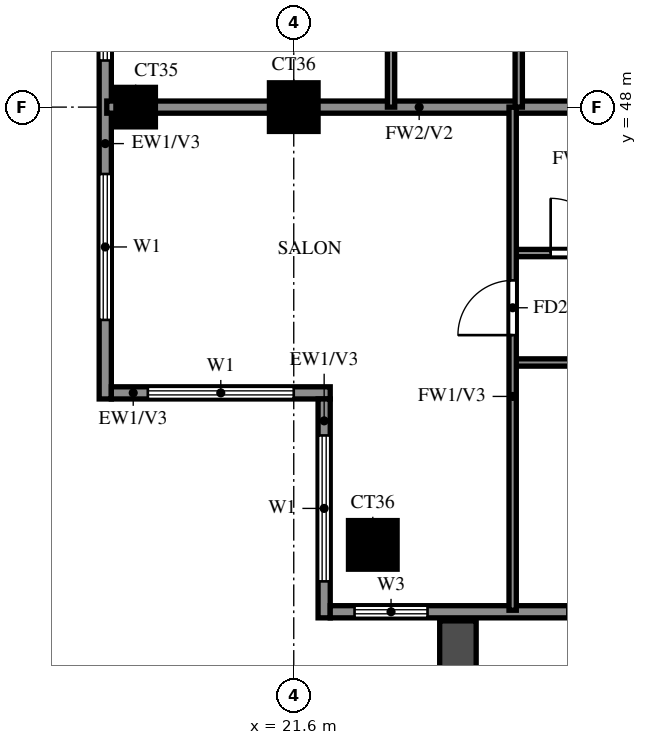
"""IFC4 building model, lengths in metres.
Left out: names, types, materials, properties, quantities, classifications, styles, units other than length and angle.
Written with IfcOpenShell. Run it as: python <this file> out.ifc"""

import sys

from ifc_helpers import new_model, si_unit, direction, frame, frame_2d, origin, origin_2d, place, context, subcontext, project, spatial, rectangle, extrude, source, transform, mapped, element, fill, save


model = new_model("IFC4")
c1 = context("Model", 3, precision=1e-05, world=origin(), true_north=direction((0.0, 1.0)))
c2 = subcontext(c1, "Body", "Model", "MODEL_VIEW")
j1 = project(units=[si_unit("LENGTHUNIT", "METRE"), si_unit("PLANEANGLEUNIT", "RADIAN")], contexts=[c1])
p1 = place(None, origin())
s1 = spatial("IfcSite", under=j1, at=p1, CompositionType="ELEMENT")
p2 = place(p1, origin())
s2 = spatial("IfcBuilding", under=s1, at=p2, CompositionType="ELEMENT")
p3 = place(p2, frame((0.0, 0.0, 236.0)))
s3 = spatial("IfcBuildingStorey", under=s2, at=p3, CompositionType="ELEMENT", Elevation=236.0)
m1 = source(origin(), c2, "Body", "SweptSolid", [
    extrude(rectangle(XDim=0.8, YDim=0.8, at=origin_2d()), origin(), (0.0, 0.0, 1.0), 3.22),
])
p4 = place(p3, frame((22.9, 40.8, 0.0), z_axis=(0.0, 0.0, 1.0), x_axis=(1.0, 0.0, 0.0)))
e1 = element("IfcColumn", 1, at=p4, inside=s3, PredefinedType="COLUMN", context=c2, shape_type="MappedRepresentation", body=[
    mapped(m1, transform((0.0, 0.0, 0.0))),
])
m2 = source(origin(), c2, "Body", "SweptSolid", [
    extrude(rectangle(XDim=0.65, YDim=0.65, at=origin_2d()), origin(), (0.0, 0.0, 1.0), 3.22),
])
p5 = place(p3, frame((19.0, 48.0, 0.0), z_axis=(0.0, 0.0, 1.0), x_axis=(1.0, 0.0, 0.0)))
e2 = element("IfcColumn", 2, at=p5, inside=s3, PredefinedType="COLUMN", context=c2, shape_type="MappedRepresentation", body=[
    mapped(m2, transform((0.0, 0.0, 0.0))),
])
p6 = place(p3, frame((21.6, 48.0, 0.0), z_axis=(0.0, 0.0, 1.0), x_axis=(1.0, 0.0, 0.0)))
e3 = element("IfcColumn", 3, at=p6, inside=s3, PredefinedType="COLUMN", context=c2, shape_type="MappedRepresentation", body=[
    mapped(m1, transform((0.0, 0.0, 0.0))),
])
p7 = place(p3, frame((18.5, 55.2, 0.0), z_axis=(0.0, 0.0, 1.0), x_axis=(0.0, -1.0, 0.0)))
e4 = element("IfcWall", 4, at=p7, inside=s3, PredefinedType="SOLIDWALL", context=c2, shape_type="SweptSolid", body=[
    extrude(rectangle(XDim=12.0, YDim=0.2, at=frame_2d((6.0, 0.0))), origin(), (0.0, 0.0, 1.0), 3.22),
])
p8 = place(p7, frame((8.3, 0.0, 0.6)))
e5 = element("IfcOpeningElement", 5, at=p8, cuts=e4, PredefinedType="OPENING", context=c2, shape_type="SweptSolid", body=[
    extrude(rectangle(XDim=2.4, YDim=2.4, at=frame_2d((1.2, 1.2))), frame((0.0, 0.11, 0.0), z_axis=(0.0, -1.0, 0.0), x_axis=(1.0, 0.0, 0.0)), (0.0, 0.0, 1.0), 0.22),
])
p9 = place(p7, frame((0.967, 0.0, 0.6)))
e6 = element("IfcOpeningElement", 6, at=p9, cuts=e4, PredefinedType="OPENING", context=c2, shape_type="SweptSolid", body=[
    extrude(rectangle(XDim=2.4, YDim=2.4, at=frame_2d((1.2, 1.2))), frame((0.0, 0.11, 0.0), z_axis=(0.0, -1.0, 0.0), x_axis=(1.0, 0.0, 0.0)), (0.0, 0.0, 1.0), 0.22),
])
p10 = place(p7, frame((4.033, 0.0, 0.6)))
e7 = element("IfcOpeningElement", 7, at=p10, cuts=e4, PredefinedType="OPENING", context=c2, shape_type="SweptSolid", body=[
    extrude(rectangle(XDim=2.4, YDim=2.4, at=frame_2d((1.2, 1.2))), frame((0.0, 0.11, 0.0), z_axis=(0.0, -1.0, 0.0), x_axis=(1.0, 0.0, 0.0)), (0.0, 0.0, 1.0), 0.22),
])
p11 = place(p3, frame((18.6, 43.3, 0.0), z_axis=(0.0, 0.0, 1.0), x_axis=(1.0, 0.0, 0.0)))
e8 = element("IfcWall", 8, at=p11, inside=s3, PredefinedType="SOLIDWALL", context=c2, shape_type="SweptSolid", body=[
    extrude(rectangle(XDim=3.6, YDim=0.2, at=frame_2d((1.8, 0.0))), origin(), (0.0, 0.0, 1.0), 3.22),
])
p12 = place(p11, frame((0.6, 0.0, 0.6)))
e9 = element("IfcOpeningElement", 9, at=p12, cuts=e8, PredefinedType="OPENING", context=c2, shape_type="SweptSolid", body=[
    extrude(rectangle(XDim=2.4, YDim=2.4, at=frame_2d((1.2, 1.2))), frame((0.0, 0.11, 0.0), z_axis=(0.0, -1.0, 0.0), x_axis=(1.0, 0.0, 0.0)), (0.0, 0.0, 1.0), 0.22),
])
p13 = place(p3, frame((22.1, 43.2, 0.0), z_axis=(0.0, 0.0, 1.0), x_axis=(0.0, -1.0, 0.0)))
e10 = element("IfcWall", 10, at=p13, inside=s3, PredefinedType="SOLIDWALL", context=c2, shape_type="SweptSolid", body=[
    extrude(rectangle(XDim=3.6, YDim=0.2, at=frame_2d((1.8, 0.0))), origin(), (0.0, 0.0, 1.0), 3.22),
])
p14 = place(p13, frame((0.6, 0.0, 0.6)))
e11 = element("IfcOpeningElement", 11, at=p14, cuts=e10, PredefinedType="OPENING", context=c2, shape_type="SweptSolid", body=[
    extrude(rectangle(XDim=2.4, YDim=2.4, at=frame_2d((1.2, 1.2))), frame((0.0, 0.11, 0.0), z_axis=(0.0, -1.0, 0.0), x_axis=(1.0, 0.0, 0.0)), (0.0, 0.0, 1.0), 0.22),
])
p15 = place(p3, frame((22.2, 39.7, 0.0), z_axis=(0.0, 0.0, 1.0), x_axis=(1.0, 0.0, 0.0)))
e12 = element("IfcWall", 12, at=p15, inside=s3, PredefinedType="SOLIDWALL", context=c2, shape_type="SweptSolid", body=[
    extrude(rectangle(XDim=19.8, YDim=0.2, at=frame_2d((9.9, 0.0))), origin(), (0.0, 0.0, 1.0), 3.22),
])
p16 = place(p15, frame((3.9, 0.0, 0.0)))
e13 = element("IfcOpeningElement", 13, at=p16, cuts=e12, PredefinedType="OPENING", context=c2, shape_type="SweptSolid", body=[
    extrude(rectangle(XDim=1.8, YDim=2.4, at=frame_2d((0.9, 1.2))), frame((0.0, 0.11, 0.0), z_axis=(0.0, -1.0, 0.0), x_axis=(1.0, 0.0, 0.0)), (0.0, 0.0, 1.0), 0.22),
])
p17 = place(p15, frame((0.4, 0.0, 0.6)))
e14 = element("IfcOpeningElement", 14, at=p17, cuts=e12, PredefinedType="OPENING", context=c2, shape_type="SweptSolid", body=[
    extrude(rectangle(XDim=1.2, YDim=2.4, at=frame_2d((0.6, 1.2))), frame((0.0, 0.11, 0.0), z_axis=(0.0, -1.0, 0.0), x_axis=(1.0, 0.0, 0.0)), (0.0, 0.0, 1.0), 0.22),
])
p18 = place(p15, frame((6.9, 0.0, 0.6)))
e15 = element("IfcOpeningElement", 15, at=p18, cuts=e12, PredefinedType="OPENING", context=c2, shape_type="SweptSolid", body=[
    extrude(rectangle(XDim=1.2, YDim=2.4, at=frame_2d((0.6, 1.2))), frame((0.0, 0.11, 0.0), z_axis=(0.0, -1.0, 0.0), x_axis=(1.0, 0.0, 0.0)), (0.0, 0.0, 1.0), 0.22),
])
p19 = place(p15, frame((9.3, 0.0, 0.6)))
e16 = element("IfcOpeningElement", 16, at=p19, cuts=e12, PredefinedType="OPENING", context=c2, shape_type="SweptSolid", body=[
    extrude(rectangle(XDim=1.8, YDim=2.4, at=frame_2d((0.9, 1.2))), frame((0.0, 0.11, 0.0), z_axis=(0.0, -1.0, 0.0), x_axis=(1.0, 0.0, 0.0)), (0.0, 0.0, 1.0), 0.22),
])
p20 = place(p3, frame((24.3, 39.55, 0.0), z_axis=(0.0, 0.0, 1.0), x_axis=(0.0, -1.0, 0.0)))
e17 = element("IfcWall", 17, at=p20, inside=s3, PredefinedType="SOLIDWALL", context=c2, shape_type="SweptSolid", body=[
    extrude(rectangle(XDim=2.65, YDim=0.6, at=frame_2d((1.325, 0.0))), origin(), (0.0, 0.0, 1.0), 2.85),
])
p21 = place(p3, frame((18.525, 48.0, 0.0), z_axis=(0.0, 0.0, 1.0), x_axis=(1.0, 0.0, 0.0)))
e18 = element("IfcWall", 18, at=p21, inside=s3, PredefinedType="SOLIDWALL", context=c2, shape_type="SweptSolid", body=[
    extrude(rectangle(XDim=10.275, YDim=0.2, at=frame_2d((5.138, 0.0))), origin(), (0.0, 0.0, 1.0), 3.22),
])
p22 = place(p3, frame((25.2, 43.8, 0.0), z_axis=(0.0, 0.0, 1.0), x_axis=(1.0, 0.0, 0.0)))
e19 = element("IfcWall", 19, at=p22, inside=s3, PredefinedType="PARTITIONING", context=c2, shape_type="SweptSolid", body=[
    extrude(rectangle(XDim=8.4, YDim=0.12, at=frame_2d((4.2, 0.0))), origin(), (0.0, 0.0, 1.0), 3.22),
])
p23 = place(p22, frame((1.35, 0.0, 0.0)))
e20 = element("IfcOpeningElement", 20, at=p23, cuts=e19, PredefinedType="OPENING", context=c2, shape_type="SweptSolid", body=[
    extrude(rectangle(XDim=0.9, YDim=2.1, at=frame_2d((0.45, 1.05))), frame((0.0, 0.07, 0.0), z_axis=(0.0, -1.0, 0.0), x_axis=(1.0, 0.0, 0.0)), (0.0, 0.0, 1.0), 0.14),
])
p24 = place(p22, frame((5.55, 0.0, 0.0)))
e21 = element("IfcOpeningElement", 21, at=p24, cuts=e19, PredefinedType="OPENING", context=c2, shape_type="SweptSolid", body=[
    extrude(rectangle(XDim=0.9, YDim=2.1, at=frame_2d((0.45, 1.05))), frame((0.0, 0.07, 0.0), z_axis=(0.0, -1.0, 0.0), x_axis=(1.0, 0.0, 0.0)), (0.0, 0.0, 1.0), 0.14),
])
p25 = place(p3, frame((25.2, 45.6, 0.0), z_axis=(0.0, 0.0, 1.0), x_axis=(1.0, 0.0, 0.0)))
e22 = element("IfcWall", 22, at=p25, inside=s3, PredefinedType="PARTITIONING", context=c2, shape_type="SweptSolid", body=[
    extrude(rectangle(XDim=6.0, YDim=0.12, at=frame_2d((3.0, 0.0))), origin(), (0.0, 0.0, 1.0), 3.22),
])
p26 = place(p25, frame((0.625, 0.0, 0.0)))
e23 = element("IfcOpeningElement", 23, at=p26, cuts=e22, PredefinedType="OPENING", context=c2, shape_type="SweptSolid", body=[
    extrude(rectangle(XDim=0.9, YDim=2.1, at=frame_2d((0.45, 1.05))), frame((0.0, 0.07, 0.0), z_axis=(0.0, -1.0, 0.0), x_axis=(1.0, 0.0, 0.0)), (0.0, 0.0, 1.0), 0.14),
])
p27 = place(p25, frame((3.625, 0.0, 0.0)))
e24 = element("IfcOpeningElement", 24, at=p27, cuts=e22, PredefinedType="OPENING", context=c2, shape_type="SweptSolid", body=[
    extrude(rectangle(XDim=0.9, YDim=2.1, at=frame_2d((0.45, 1.05))), frame((0.0, 0.07, 0.0), z_axis=(0.0, -1.0, 0.0), x_axis=(1.0, 0.0, 0.0)), (0.0, 0.0, 1.0), 0.14),
])
p28 = place(p3, frame((23.2, 48.0, 0.0), z_axis=(0.0, 0.0, 1.0), x_axis=(0.0, 1.0, 0.0)))
e25 = element("IfcWall", 25, at=p28, inside=s3, PredefinedType="PARTITIONING", context=c2, shape_type="SweptSolid", body=[
    extrude(rectangle(XDim=25.2, YDim=0.12, at=frame_2d((12.6, 0.0))), origin(), (0.0, 0.0, 1.0), 3.22),
])
p29 = place(p28, frame((2.85, 0.0, 0.0)))
e26 = element("IfcOpeningElement", 26, at=p29, cuts=e25, PredefinedType="OPENING", context=c2, shape_type="SweptSolid", body=[
    extrude(rectangle(XDim=1.5, YDim=2.1, at=frame_2d((0.75, 1.05))), frame((0.0, 0.07, 0.0), z_axis=(0.0, -1.0, 0.0), x_axis=(1.0, 0.0, 0.0)), (0.0, 0.0, 1.0), 0.14),
])
p30 = place(p28, frame((8.55, 0.0, 0.0)))
e27 = element("IfcOpeningElement", 27, at=p30, cuts=e25, PredefinedType="OPENING", context=c2, shape_type="SweptSolid", body=[
    extrude(rectangle(XDim=0.9, YDim=2.1, at=frame_2d((0.45, 1.05))), frame((0.0, 0.07, 0.0), z_axis=(0.0, -1.0, 0.0), x_axis=(1.0, 0.0, 0.0)), (0.0, 0.0, 1.0), 0.14),
])
p31 = place(p28, frame((12.15, 0.0, 0.0)))
e28 = element("IfcOpeningElement", 28, at=p31, cuts=e25, PredefinedType="OPENING", context=c2, shape_type="SweptSolid", body=[
    extrude(rectangle(XDim=0.9, YDim=2.1, at=frame_2d((0.45, 1.05))), frame((0.0, 0.07, 0.0), z_axis=(0.0, -1.0, 0.0), x_axis=(1.0, 0.0, 0.0)), (0.0, 0.0, 1.0), 0.14),
])
p32 = place(p28, frame((15.75, 0.0, 0.0)))
e29 = element("IfcOpeningElement", 29, at=p32, cuts=e25, PredefinedType="OPENING", context=c2, shape_type="SweptSolid", body=[
    extrude(rectangle(XDim=0.9, YDim=2.1, at=frame_2d((0.45, 1.05))), frame((0.0, 0.07, 0.0), z_axis=(0.0, -1.0, 0.0), x_axis=(1.0, 0.0, 0.0)), (0.0, 0.0, 1.0), 0.14),
])
p33 = place(p28, frame((19.35, 0.0, 0.0)))
e30 = element("IfcOpeningElement", 30, at=p33, cuts=e25, PredefinedType="OPENING", context=c2, shape_type="SweptSolid", body=[
    extrude(rectangle(XDim=0.9, YDim=2.1, at=frame_2d((0.45, 1.05))), frame((0.0, 0.07, 0.0), z_axis=(0.0, -1.0, 0.0), x_axis=(1.0, 0.0, 0.0)), (0.0, 0.0, 1.0), 0.14),
])
p34 = place(p28, frame((22.95, 0.0, 0.0)))
e31 = element("IfcOpeningElement", 31, at=p34, cuts=e25, PredefinedType="OPENING", context=c2, shape_type="SweptSolid", body=[
    extrude(rectangle(XDim=0.9, YDim=2.1, at=frame_2d((0.45, 1.05))), frame((0.0, 0.07, 0.0), z_axis=(0.0, -1.0, 0.0), x_axis=(1.0, 0.0, 0.0)), (0.0, 0.0, 1.0), 0.14),
])
p35 = place(p3, frame((25.2, 39.725, 0.0), z_axis=(0.0, 0.0, 1.0), x_axis=(0.0, 1.0, 0.0)))
e32 = element("IfcWall", 32, at=p35, inside=s3, PredefinedType="PARTITIONING", context=c2, shape_type="SweptSolid", body=[
    extrude(rectangle(XDim=8.275, YDim=0.12, at=frame_2d((4.137, 0.0))), origin(), (0.0, 0.0, 1.0), 3.22),
])
p36 = place(p35, frame((4.525, 0.0, 0.0)))
e33 = element("IfcOpeningElement", 33, at=p36, cuts=e32, PredefinedType="OPENING", context=c2, shape_type="SweptSolid", body=[
    extrude(rectangle(XDim=0.9, YDim=2.1, at=frame_2d((0.45, 1.05))), frame((0.0, 0.07, 0.0), z_axis=(0.0, -1.0, 0.0), x_axis=(1.0, 0.0, 0.0)), (0.0, 0.0, 1.0), 0.14),
])
p37 = place(p3, frame((25.3, 48.0, 0.0), z_axis=(0.0, 0.0, 1.0), x_axis=(0.0, 1.0, 0.0)))
e34 = element("IfcWall", 34, at=p37, inside=s3, PredefinedType="PARTITIONING", context=c2, shape_type="SweptSolid", body=[
    extrude(rectangle(XDim=2.4, YDim=0.12, at=frame_2d((1.2, 0.0))), origin(), (0.0, 0.0, 1.0), 3.22),
])
p38 = place(p8, origin())
e35 = element("IfcWindow", 35, at=p38, inside=s3, PartitioningType="DOUBLE_PANEL_VERTICAL", PredefinedType="WINDOW", context=c2, shape_type="SweptSolid", body=[
    extrude(rectangle(XDim=2.4, YDim=2.4, at=frame_2d((1.2, 1.2))), frame((0.0, 0.03, 0.0), z_axis=(0.0, -1.0, 0.0), x_axis=(1.0, 0.0, 0.0)), (0.0, 0.0, 1.0), 0.06),
])
fill(e5, e35)
p39 = place(p10, origin())
e36 = element("IfcWindow", 36, at=p39, inside=s3, PartitioningType="DOUBLE_PANEL_VERTICAL", PredefinedType="WINDOW", context=c2, shape_type="SweptSolid", body=[
    extrude(rectangle(XDim=2.4, YDim=2.4, at=frame_2d((1.2, 1.2))), frame((0.0, 0.03, 0.0), z_axis=(0.0, -1.0, 0.0), x_axis=(1.0, 0.0, 0.0)), (0.0, 0.0, 1.0), 0.06),
])
fill(e7, e36)
p40 = place(p12, origin())
e37 = element("IfcWindow", 37, at=p40, inside=s3, PartitioningType="DOUBLE_PANEL_VERTICAL", PredefinedType="WINDOW", context=c2, shape_type="SweptSolid", body=[
    extrude(rectangle(XDim=2.4, YDim=2.4, at=frame_2d((1.2, 1.2))), frame((0.0, 0.03, 0.0), z_axis=(0.0, -1.0, 0.0), x_axis=(1.0, 0.0, 0.0)), (0.0, 0.0, 1.0), 0.06),
])
fill(e9, e37)
p41 = place(p14, origin())
e38 = element("IfcWindow", 38, at=p41, inside=s3, PartitioningType="DOUBLE_PANEL_VERTICAL", PredefinedType="WINDOW", context=c2, shape_type="SweptSolid", body=[
    extrude(rectangle(XDim=2.4, YDim=2.4, at=frame_2d((1.2, 1.2))), frame((0.0, 0.03, 0.0), z_axis=(0.0, -1.0, 0.0), x_axis=(1.0, 0.0, 0.0)), (0.0, 0.0, 1.0), 0.06),
])
fill(e11, e38)
p42 = place(p16, origin())
e39 = element("IfcDoor", 39, at=p42, inside=s3, OperationType="DOUBLE_DOOR_SLIDING", PredefinedType="DOOR", context=c2, shape_type="SweptSolid", body=[
    extrude(rectangle(XDim=1.8, YDim=2.4, at=frame_2d((0.9, 1.2))), frame((0.0, 0.025, 0.0), z_axis=(0.0, -1.0, 0.0), x_axis=(1.0, 0.0, 0.0)), (0.0, 0.0, 1.0), 0.05),
])
fill(e13, e39)
p43 = place(p17, origin())
e40 = element("IfcWindow", 40, at=p43, inside=s3, PartitioningType="SINGLE_PANEL", PredefinedType="WINDOW", context=c2, shape_type="SweptSolid", body=[
    extrude(rectangle(XDim=1.2, YDim=2.4, at=frame_2d((0.6, 1.2))), frame((0.0, 0.03, 0.0), z_axis=(0.0, -1.0, 0.0), x_axis=(1.0, 0.0, 0.0)), (0.0, 0.0, 1.0), 0.06),
])
fill(e14, e40)
p44 = place(p36, origin())
e41 = element("IfcDoor", 41, at=p44, inside=s3, OperationType="SINGLE_SWING_LEFT", PredefinedType="DOOR", context=c2, shape_type="SweptSolid", body=[
    extrude(rectangle(XDim=0.9, YDim=2.1, at=frame_2d((0.45, 1.05))), frame((0.0, 0.025, 0.0), z_axis=(0.0, -1.0, 0.0), x_axis=(1.0, 0.0, 0.0)), (0.0, 0.0, 1.0), 0.05),
])
fill(e33, e41)
p45 = place(p26, origin())
e42 = element("IfcDoor", 42, at=p45, inside=s3, OperationType="SINGLE_SWING_LEFT", PredefinedType="DOOR", context=c2, shape_type="SweptSolid", body=[
    extrude(rectangle(XDim=0.9, YDim=2.1, at=frame_2d((0.45, 1.05))), frame((0.0, 0.025, 0.0), z_axis=(0.0, -1.0, 0.0), x_axis=(1.0, 0.0, 0.0)), (0.0, 0.0, 1.0), 0.05),
])
fill(e23, e42)
save(model, sys.argv[1])
